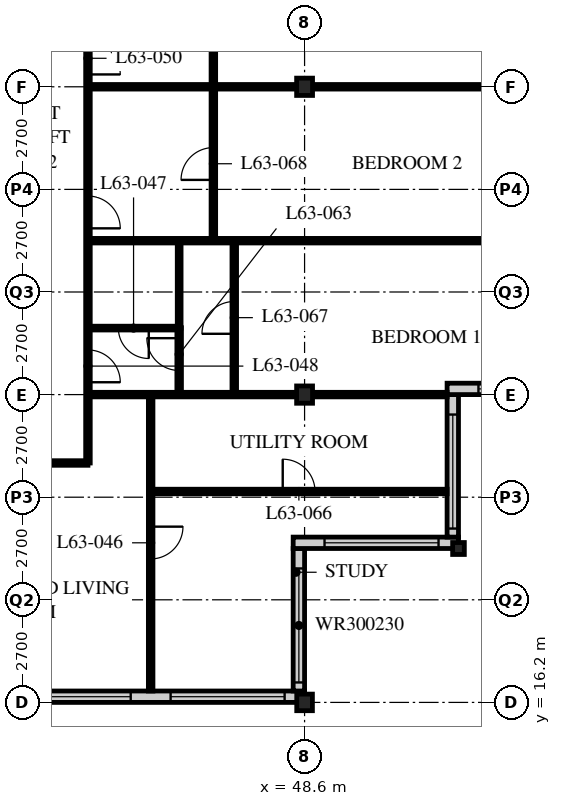
"""IFC4 building model, lengths in metres.
Left out: names, types, materials, properties, quantities, classifications, styles, units other than length and angle.
Written with IfcOpenShell. Run it as: python <this file> out.ifc"""

import sys

from ifc_helpers import new_model, si_unit, direction, frame, frame_2d, origin, origin_2d, place, context, subcontext, project, spatial, rectangle, i_section, extrude, element, fill, save


model = new_model("IFC4")
c1 = context("Model", 3, precision=1e-05, world=origin(), true_north=direction((0.0, 1.0)))
c2 = subcontext(c1, "Body", "Model", "MODEL_VIEW")
j1 = project(units=[si_unit("LENGTHUNIT", "METRE"), si_unit("PLANEANGLEUNIT", "RADIAN")], contexts=[c1])
p1 = place(None, origin())
s1 = spatial("IfcSite", under=j1, at=p1, CompositionType="ELEMENT")
p2 = place(p1, origin())
s2 = spatial("IfcBuilding", under=s1, at=p2, CompositionType="ELEMENT")
p3 = place(p2, frame((0.0, 0.0, 246.3)))
s3 = spatial("IfcBuildingStorey", under=s2, at=p3, CompositionType="ELEMENT", Elevation=246.3)
p4 = place(p3, frame((48.6, 16.2, 0.0), z_axis=(0.0, 0.0, 1.0), x_axis=(1.0, 0.0, 0.0)))
e1 = element("IfcColumn", 1, at=p4, inside=s3, PredefinedType="COLUMN", context=c2, shape_type="SweptSolid", body=[
    extrude(i_section(OverallWidth=0.412, OverallDepth=0.437, WebThickness=0.036, FlangeThickness=0.058, FilletRadius=0.015, at=origin_2d()), origin(), (0.0, 0.0, 1.0), 3.9),
])
for number, where, z_axis, x_axis in (
    (2, (48.6, 24.3, 0.0), (0.0, 0.0, 1.0), (1.0, 0.0, 0.0)),
    (3, (48.6, 32.4, 0.0), (0.0, 0.0, 1.0), (1.0, 0.0, 0.0)),
):
    element("IfcColumn", number, at=place(p3, frame(where, z_axis=z_axis, x_axis=x_axis)), inside=s3, PredefinedType="COLUMN", context=c2, shape_type="SweptSolid", body=[
        extrude(i_section(OverallWidth=0.418, OverallDepth=0.456, WebThickness=0.042, FlangeThickness=0.067, FilletRadius=0.015, at=origin_2d()), origin(), (0.0, 0.0, 1.0), 3.9),
    ])
p5 = place(p3, frame((52.65, 20.25, 0.0), z_axis=(0.0, 0.0, 1.0), x_axis=(1.0, 0.0, 0.0)))
e4 = element("IfcColumn", 4, at=p5, inside=s3, PredefinedType="COLUMN", context=c2, shape_type="SweptSolid", body=[
    extrude(i_section(OverallWidth=0.307, OverallDepth=0.314, WebThickness=0.012, FlangeThickness=0.019, FilletRadius=0.015, at=origin_2d()), origin(), (0.0, 0.0, 1.0), 3.9),
])
p6 = place(p3, frame((8.4, 16.35, 0.0), z_axis=(0.0, 0.0, 1.0), x_axis=(1.0, 0.0, 0.0)))
e5 = element("IfcWall", 5, at=p6, inside=s3, PredefinedType="SOLIDWALL", context=c2, shape_type="SweptSolid", body=[
    extrude(rectangle(XDim=40.2, YDim=0.3, at=frame_2d((20.1, 0.0))), origin(), (0.0, 0.0, 1.0), 3.69),
])
p7 = place(p6, frame((0.225, 0.0, 0.6)))
e6 = element("IfcOpeningElement", 6, at=p7, cuts=e5, PredefinedType="OPENING", context=c2, shape_type="SweptSolid", body=[
    extrude(rectangle(XDim=3.0, YDim=2.4, at=frame_2d((1.5, 1.2))), frame((0.0, 0.16, 0.0), z_axis=(0.0, -1.0, 0.0), x_axis=(1.0, 0.0, 0.0)), (0.0, 0.0, 1.0), 0.32),
])
p8 = place(p6, frame((4.275, 0.0, 0.6)))
e7 = element("IfcOpeningElement", 7, at=p8, cuts=e5, PredefinedType="OPENING", context=c2, shape_type="SweptSolid", body=[
    extrude(rectangle(XDim=3.0, YDim=2.4, at=frame_2d((1.5, 1.2))), frame((0.0, 0.16, 0.0), z_axis=(0.0, -1.0, 0.0), x_axis=(1.0, 0.0, 0.0)), (0.0, 0.0, 1.0), 0.32),
])
p9 = place(p6, frame((8.325, 0.0, 0.6)))
e8 = element("IfcOpeningElement", 8, at=p9, cuts=e5, PredefinedType="OPENING", context=c2, shape_type="SweptSolid", body=[
    extrude(rectangle(XDim=3.0, YDim=2.4, at=frame_2d((1.5, 1.2))), frame((0.0, 0.16, 0.0), z_axis=(0.0, -1.0, 0.0), x_axis=(1.0, 0.0, 0.0)), (0.0, 0.0, 1.0), 0.32),
])
p10 = place(p6, frame((12.375, 0.0, 0.6)))
e9 = element("IfcOpeningElement", 9, at=p10, cuts=e5, PredefinedType="OPENING", context=c2, shape_type="SweptSolid", body=[
    extrude(rectangle(XDim=3.0, YDim=2.4, at=frame_2d((1.5, 1.2))), frame((0.0, 0.16, 0.0), z_axis=(0.0, -1.0, 0.0), x_axis=(1.0, 0.0, 0.0)), (0.0, 0.0, 1.0), 0.32),
])
p11 = place(p6, frame((16.425, 0.0, 0.6)))
e10 = element("IfcOpeningElement", 10, at=p11, cuts=e5, PredefinedType="OPENING", context=c2, shape_type="SweptSolid", body=[
    extrude(rectangle(XDim=3.0, YDim=2.4, at=frame_2d((1.5, 1.2))), frame((0.0, 0.16, 0.0), z_axis=(0.0, -1.0, 0.0), x_axis=(1.0, 0.0, 0.0)), (0.0, 0.0, 1.0), 0.32),
])
p12 = place(p6, frame((20.475, 0.0, 0.6)))
e11 = element("IfcOpeningElement", 11, at=p12, cuts=e5, PredefinedType="OPENING", context=c2, shape_type="SweptSolid", body=[
    extrude(rectangle(XDim=3.0, YDim=2.4, at=frame_2d((1.5, 1.2))), frame((0.0, 0.16, 0.0), z_axis=(0.0, -1.0, 0.0), x_axis=(1.0, 0.0, 0.0)), (0.0, 0.0, 1.0), 0.32),
])
p13 = place(p6, frame((24.525, 0.0, 0.6)))
e12 = element("IfcOpeningElement", 12, at=p13, cuts=e5, PredefinedType="OPENING", context=c2, shape_type="SweptSolid", body=[
    extrude(rectangle(XDim=3.0, YDim=2.4, at=frame_2d((1.5, 1.2))), frame((0.0, 0.16, 0.0), z_axis=(0.0, -1.0, 0.0), x_axis=(1.0, 0.0, 0.0)), (0.0, 0.0, 1.0), 0.32),
])
p14 = place(p6, frame((28.575, 0.0, 0.6)))
e13 = element("IfcOpeningElement", 13, at=p14, cuts=e5, PredefinedType="OPENING", context=c2, shape_type="SweptSolid", body=[
    extrude(rectangle(XDim=3.0, YDim=2.4, at=frame_2d((1.5, 1.2))), frame((0.0, 0.16, 0.0), z_axis=(0.0, -1.0, 0.0), x_axis=(1.0, 0.0, 0.0)), (0.0, 0.0, 1.0), 0.32),
])
p15 = place(p6, frame((32.625, 0.0, 0.6)))
e14 = element("IfcOpeningElement", 14, at=p15, cuts=e5, PredefinedType="OPENING", context=c2, shape_type="SweptSolid", body=[
    extrude(rectangle(XDim=3.0, YDim=2.4, at=frame_2d((1.5, 1.2))), frame((0.0, 0.16, 0.0), z_axis=(0.0, -1.0, 0.0), x_axis=(1.0, 0.0, 0.0)), (0.0, 0.0, 1.0), 0.32),
])
p16 = place(p6, frame((36.675, 0.0, 0.6)))
e15 = element("IfcOpeningElement", 15, at=p16, cuts=e5, PredefinedType="OPENING", context=c2, shape_type="SweptSolid", body=[
    extrude(rectangle(XDim=3.0, YDim=2.4, at=frame_2d((1.5, 1.2))), frame((0.0, 0.16, 0.0), z_axis=(0.0, -1.0, 0.0), x_axis=(1.0, 0.0, 0.0)), (0.0, 0.0, 1.0), 0.32),
])
p17 = place(p3, frame((48.45, 16.5, 0.0), z_axis=(0.0, 0.0, 1.0), x_axis=(0.0, 1.0, 0.0)))
e16 = element("IfcWall", 16, at=p17, inside=s3, PredefinedType="SOLIDWALL", context=c2, shape_type="SweptSolid", body=[
    extrude(rectangle(XDim=3.75, YDim=0.3, at=frame_2d((1.875, 0.0))), origin(), (0.0, 0.0, 1.0), 3.69),
])
p18 = place(p17, frame((0.225, 0.0, 0.6)))
e17 = element("IfcOpeningElement", 17, at=p18, cuts=e16, PredefinedType="OPENING", context=c2, shape_type="SweptSolid", body=[
    extrude(rectangle(XDim=3.0, YDim=2.3, at=frame_2d((1.5, 1.15))), frame((0.0, 0.16, 0.0), z_axis=(0.0, -1.0, 0.0), x_axis=(1.0, 0.0, 0.0)), (0.0, 0.0, 1.0), 0.32),
])
p19 = place(p3, frame((48.3, 20.4, 0.0), z_axis=(0.0, 0.0, 1.0), x_axis=(1.0, 0.0, 0.0)))
e18 = element("IfcWall", 18, at=p19, inside=s3, PredefinedType="SOLIDWALL", context=c2, shape_type="SweptSolid", body=[
    extrude(rectangle(XDim=4.35, YDim=0.3, at=frame_2d((2.175, 0.0))), origin(), (0.0, 0.0, 1.0), 3.69),
])
p20 = place(p19, frame((0.825, 0.0, 0.6)))
e19 = element("IfcOpeningElement", 19, at=p20, cuts=e18, PredefinedType="OPENING", context=c2, shape_type="SweptSolid", body=[
    extrude(rectangle(XDim=3.0, YDim=2.3, at=frame_2d((1.5, 1.15))), frame((0.0, 0.16, 0.0), z_axis=(0.0, -1.0, 0.0), x_axis=(1.0, 0.0, 0.0)), (0.0, 0.0, 1.0), 0.32),
])
p21 = place(p3, frame((52.5, 20.55, 0.0), z_axis=(0.0, 0.0, 1.0), x_axis=(0.0, 1.0, 0.0)))
e20 = element("IfcWall", 20, at=p21, inside=s3, PredefinedType="SOLIDWALL", context=c2, shape_type="SweptSolid", body=[
    extrude(rectangle(XDim=3.75, YDim=0.3, at=frame_2d((1.875, 0.0))), origin(), (0.0, 0.0, 1.0), 3.69),
])
p22 = place(p21, frame((0.225, 0.0, 0.6)))
e21 = element("IfcOpeningElement", 21, at=p22, cuts=e20, PredefinedType="OPENING", context=c2, shape_type="SweptSolid", body=[
    extrude(rectangle(XDim=3.0, YDim=2.3, at=frame_2d((1.5, 1.15))), frame((0.0, 0.16, 0.0), z_axis=(0.0, -1.0, 0.0), x_axis=(1.0, 0.0, 0.0)), (0.0, 0.0, 1.0), 0.32),
])
p23 = place(p3, frame((52.35, 24.45, 0.0), z_axis=(0.0, 0.0, 1.0), x_axis=(1.0, 0.0, 0.0)))
e22 = element("IfcWall", 22, at=p23, inside=s3, PredefinedType="SOLIDWALL", context=c2, shape_type="SweptSolid", body=[
    extrude(rectangle(XDim=4.35, YDim=0.3, at=frame_2d((2.175, 0.0))), origin(), (0.0, 0.0, 1.0), 3.69),
])
p24 = place(p23, frame((0.825, 0.0, 0.6)))
e23 = element("IfcOpeningElement", 23, at=p24, cuts=e22, PredefinedType="OPENING", context=c2, shape_type="SweptSolid", body=[
    extrude(rectangle(XDim=3.0, YDim=2.3, at=frame_2d((1.5, 1.15))), frame((0.0, 0.16, 0.0), z_axis=(0.0, -1.0, 0.0), x_axis=(1.0, 0.0, 0.0)), (0.0, 0.0, 1.0), 0.32),
])
p25 = place(p3, frame((42.9, 22.5, 0.0), z_axis=(0.0, 0.0, 1.0), x_axis=(0.0, 1.0, 0.0)))
e24 = element("IfcWall", 24, at=p25, inside=s3, PredefinedType="PARTITIONING", context=c2, shape_type="SweptSolid", body=[
    extrude(rectangle(XDim=13.95, YDim=0.12, at=frame_2d((6.975, 0.0))), origin(), (0.0, 0.0, 1.0), 3.69),
])
p26 = place(p25, frame((2.125, 0.0, 0.0)))
e25 = element("IfcOpeningElement", 25, at=p26, cuts=e24, PredefinedType="OPENING", context=c2, shape_type="SweptSolid", body=[
    extrude(rectangle(XDim=0.85, YDim=2.1, at=frame_2d((0.425, 1.05))), frame((0.0, 0.07, 0.0), z_axis=(0.0, -1.0, 0.0), x_axis=(1.0, 0.0, 0.0)), (0.0, 0.0, 1.0), 0.14),
])
p27 = place(p25, frame((6.175, 0.0, 0.0)))
e26 = element("IfcOpeningElement", 26, at=p27, cuts=e24, PredefinedType="OPENING", context=c2, shape_type="SweptSolid", body=[
    extrude(rectangle(XDim=0.85, YDim=2.1, at=frame_2d((0.425, 1.05))), frame((0.0, 0.07, 0.0), z_axis=(0.0, -1.0, 0.0), x_axis=(1.0, 0.0, 0.0)), (0.0, 0.0, 1.0), 0.14),
])
p28 = place(p25, frame((10.225, 0.0, 0.0)))
e27 = element("IfcOpeningElement", 27, at=p28, cuts=e24, PredefinedType="OPENING", context=c2, shape_type="SweptSolid", body=[
    extrude(rectangle(XDim=0.85, YDim=2.1, at=frame_2d((0.425, 1.05))), frame((0.0, 0.07, 0.0), z_axis=(0.0, -1.0, 0.0), x_axis=(1.0, 0.0, 0.0)), (0.0, 0.0, 1.0), 0.14),
])
p29 = place(p3, frame((36.45, 22.5, 0.0), z_axis=(0.0, 0.0, 1.0), x_axis=(1.0, 0.0, 0.0)))
e28 = element("IfcWall", 28, at=p29, inside=s3, PredefinedType="PARTITIONING", context=c2, shape_type="SweptSolid", body=[
    extrude(rectangle(XDim=6.45, YDim=0.12, at=frame_2d((3.225, 0.0))), origin(), (0.0, 0.0, 1.0), 3.69),
])
p30 = place(p29, frame((2.8, 0.0, 0.0)))
e29 = element("IfcOpeningElement", 29, at=p30, cuts=e28, PredefinedType="OPENING", context=c2, shape_type="SweptSolid", body=[
    extrude(rectangle(XDim=0.85, YDim=2.1, at=frame_2d((0.425, 1.05))), frame((0.0, 0.07, 0.0), z_axis=(0.0, -1.0, 0.0), x_axis=(1.0, 0.0, 0.0)), (0.0, 0.0, 1.0), 0.14),
])
p31 = place(p3, frame((42.9, 24.3, 0.0), z_axis=(0.0, 0.0, 1.0), x_axis=(1.0, 0.0, 0.0)))
e30 = element("IfcWall", 30, at=p31, inside=s3, PredefinedType="PARTITIONING", context=c2, shape_type="SweptSolid", body=[
    extrude(rectangle(XDim=9.45, YDim=0.12, at=frame_2d((4.725, 0.0))), origin(), (0.0, 0.0, 1.0), 3.078),
])
p32 = place(p3, frame((44.55, 16.5, 0.0), z_axis=(0.0, 0.0, 1.0), x_axis=(0.0, 1.0, 0.0)))
e31 = element("IfcWall", 31, at=p32, inside=s3, PredefinedType="PARTITIONING", context=c2, shape_type="SweptSolid", body=[
    extrude(rectangle(XDim=7.8, YDim=0.12, at=frame_2d((3.9, 0.0))), origin(), (0.0, 0.0, 1.0), 3.69),
])
p33 = place(p32, frame((3.475, 0.0, 0.0)))
e32 = element("IfcOpeningElement", 32, at=p33, cuts=e31, PredefinedType="OPENING", context=c2, shape_type="SweptSolid", body=[
    extrude(rectangle(XDim=0.85, YDim=2.1, at=frame_2d((0.425, 1.05))), frame((0.0, 0.07, 0.0), z_axis=(0.0, -1.0, 0.0), x_axis=(1.0, 0.0, 0.0)), (0.0, 0.0, 1.0), 0.14),
])
p34 = place(p3, frame((42.9, 26.05, 0.0), z_axis=(0.0, 0.0, 1.0), x_axis=(1.0, 0.0, 0.0)))
e33 = element("IfcWall", 33, at=p34, inside=s3, PredefinedType="PARTITIONING", context=c2, shape_type="SweptSolid", body=[
    extrude(rectangle(XDim=2.4, YDim=0.1, at=frame_2d((1.2, 0.0))), origin(), (0.0, 0.0, 1.0), 3.69),
])
p35 = place(p34, frame((0.8, 0.0, 0.0)))
e34 = element("IfcOpeningElement", 34, at=p35, cuts=e33, PredefinedType="OPENING", context=c2, shape_type="SweptSolid", body=[
    extrude(rectangle(XDim=0.8, YDim=2.1, at=frame_2d((0.4, 1.05))), frame((0.0, 0.06, 0.0), z_axis=(0.0, -1.0, 0.0), x_axis=(1.0, 0.0, 0.0)), (0.0, 0.0, 1.0), 0.12),
])
p36 = place(p3, frame((45.3, 26.05, 0.0), z_axis=(0.0, 0.0, 1.0), x_axis=(0.0, 1.0, 0.0)))
e35 = element("IfcWall", 35, at=p36, inside=s3, PredefinedType="PARTITIONING", context=c2, shape_type="SweptSolid", body=[
    extrude(rectangle(XDim=2.3, YDim=0.1, at=frame_2d((1.15, 0.0))), origin(), (0.0, 0.0, 1.0), 3.69),
])
p37 = place(p3, frame((42.9, 28.35, 0.0), z_axis=(0.0, 0.0, 1.0), x_axis=(1.0, 0.0, 0.0)))
e36 = element("IfcWall", 36, at=p37, inside=s3, PredefinedType="PARTITIONING", context=c2, shape_type="SweptSolid", body=[
    extrude(rectangle(XDim=13.5, YDim=0.12, at=frame_2d((6.75, 0.0))), origin(), (0.0, 0.0, 1.0), 3.69),
])
p38 = place(p3, frame((42.9, 32.4, 0.0), z_axis=(0.0, 0.0, 1.0), x_axis=(1.0, 0.0, 0.0)))
e37 = element("IfcWall", 37, at=p38, inside=s3, PredefinedType="PARTITIONING", context=c2, shape_type="SweptSolid", body=[
    extrude(rectangle(XDim=13.5, YDim=0.12, at=frame_2d((6.75, 0.0))), origin(), (0.0, 0.0, 1.0), 3.078),
])
p39 = place(p3, frame((45.3, 24.3, 0.0), z_axis=(0.0, 0.0, 1.0), x_axis=(0.0, 1.0, 0.0)))
e38 = element("IfcWall", 38, at=p39, inside=s3, PredefinedType="PARTITIONING", context=c2, shape_type="SweptSolid", body=[
    extrude(rectangle(XDim=1.76, YDim=0.12, at=frame_2d((0.88, 0.0))), origin(), (0.0, 0.0, 1.0), 3.69),
])
p40 = place(p39, frame((0.635, 0.0, 0.0)))
e39 = element("IfcOpeningElement", 39, at=p40, cuts=e38, PredefinedType="OPENING", context=c2, shape_type="SweptSolid", body=[
    extrude(rectangle(XDim=0.85, YDim=2.1, at=frame_2d((0.425, 1.05))), frame((0.0, 0.07, 0.0), z_axis=(0.0, -1.0, 0.0), x_axis=(1.0, 0.0, 0.0)), (0.0, 0.0, 1.0), 0.14),
])
p41 = place(p3, frame((44.55, 21.75, 0.0), z_axis=(0.0, 0.0, 1.0), x_axis=(1.0, 0.0, 0.0)))
e40 = element("IfcWall", 40, at=p41, inside=s3, PredefinedType="PARTITIONING", context=c2, shape_type="SweptSolid", body=[
    extrude(rectangle(XDim=7.8, YDim=0.12, at=frame_2d((3.9, 0.0))), origin(), (0.0, 0.0, 1.0), 3.69),
])
p42 = place(p41, frame((3.475, 0.0, 0.0)))
e41 = element("IfcOpeningElement", 41, at=p42, cuts=e40, PredefinedType="OPENING", context=c2, shape_type="SweptSolid", body=[
    extrude(rectangle(XDim=0.85, YDim=2.1, at=frame_2d((0.425, 1.05))), frame((0.0, 0.07, 0.0), z_axis=(0.0, -1.0, 0.0), x_axis=(1.0, 0.0, 0.0)), (0.0, 0.0, 1.0), 0.14),
])
p43 = place(p3, frame((46.75, 24.3, 0.0), z_axis=(0.0, 0.0, 1.0), x_axis=(0.0, 1.0, 0.0)))
e42 = element("IfcWall", 42, at=p43, inside=s3, PredefinedType="PARTITIONING", context=c2, shape_type="SweptSolid", body=[
    extrude(rectangle(XDim=4.05, YDim=0.12, at=frame_2d((2.025, 0.0))), origin(), (0.0, 0.0, 1.0), 3.69),
])
p44 = place(p43, frame((1.6, 0.0, 0.0)))
e43 = element("IfcOpeningElement", 43, at=p44, cuts=e42, PredefinedType="OPENING", context=c2, shape_type="SweptSolid", body=[
    extrude(rectangle(XDim=0.85, YDim=2.1, at=frame_2d((0.425, 1.05))), frame((0.0, 0.07, 0.0), z_axis=(0.0, -1.0, 0.0), x_axis=(1.0, 0.0, 0.0)), (0.0, 0.0, 1.0), 0.14),
])
p45 = place(p3, frame((46.2, 28.35, 0.0), z_axis=(0.0, 0.0, 1.0), x_axis=(0.0, 1.0, 0.0)))
e44 = element("IfcWall", 44, at=p45, inside=s3, PredefinedType="PARTITIONING", context=c2, shape_type="SweptSolid", body=[
    extrude(rectangle(XDim=16.2, YDim=0.12, at=frame_2d((8.1, 0.0))), origin(), (0.0, 0.0, 1.0), 3.69),
])
p46 = place(p45, frame((1.6, 0.0, 0.0)))
e45 = element("IfcOpeningElement", 45, at=p46, cuts=e44, PredefinedType="OPENING", context=c2, shape_type="SweptSolid", body=[
    extrude(rectangle(XDim=0.85, YDim=2.1, at=frame_2d((0.425, 1.05))), frame((0.0, 0.07, 0.0), z_axis=(0.0, -1.0, 0.0), x_axis=(1.0, 0.0, 0.0)), (0.0, 0.0, 1.0), 0.14),
])
p47 = place(p45, frame((5.65, 0.0, 0.0)))
e46 = element("IfcOpeningElement", 46, at=p47, cuts=e44, PredefinedType="OPENING", context=c2, shape_type="SweptSolid", body=[
    extrude(rectangle(XDim=0.85, YDim=2.1, at=frame_2d((0.425, 1.05))), frame((0.0, 0.07, 0.0), z_axis=(0.0, -1.0, 0.0), x_axis=(1.0, 0.0, 0.0)), (0.0, 0.0, 1.0), 0.14),
])
p48 = place(p45, frame((13.75, 0.0, 0.0)))
e47 = element("IfcOpeningElement", 47, at=p48, cuts=e44, PredefinedType="OPENING", context=c2, shape_type="SweptSolid", body=[
    extrude(rectangle(XDim=0.85, YDim=2.1, at=frame_2d((0.425, 1.05))), frame((0.0, 0.07, 0.0), z_axis=(0.0, -1.0, 0.0), x_axis=(1.0, 0.0, 0.0)), (0.0, 0.0, 1.0), 0.14),
])
p49 = place(p45, frame((9.7, 0.0, 0.0)))
e48 = element("IfcOpeningElement", 48, at=p49, cuts=e44, PredefinedType="OPENING", context=c2, shape_type="SweptSolid", body=[
    extrude(rectangle(XDim=0.85, YDim=2.1, at=frame_2d((0.425, 1.05))), frame((0.0, 0.07, 0.0), z_axis=(0.0, -1.0, 0.0), x_axis=(1.0, 0.0, 0.0)), (0.0, 0.0, 1.0), 0.14),
])
p50 = place(p15, origin())
e49 = element("IfcWindow", 49, at=p50, inside=s3, PartitioningType="SINGLE_PANEL", PredefinedType="WINDOW", context=c2, shape_type="SweptSolid", body=[
    extrude(rectangle(XDim=3.0, YDim=2.4, at=frame_2d((1.5, 1.2))), frame((0.0, 0.03, 0.0), z_axis=(0.0, -1.0, 0.0), x_axis=(1.0, 0.0, 0.0)), (0.0, 0.0, 1.0), 0.06),
])
fill(e14, e49)
p51 = place(p16, origin())
e50 = element("IfcWindow", 50, at=p51, inside=s3, PartitioningType="SINGLE_PANEL", PredefinedType="WINDOW", context=c2, shape_type="SweptSolid", body=[
    extrude(rectangle(XDim=3.0, YDim=2.4, at=frame_2d((1.5, 1.2))), frame((0.0, 0.03, 0.0), z_axis=(0.0, -1.0, 0.0), x_axis=(1.0, 0.0, 0.0)), (0.0, 0.0, 1.0), 0.06),
])
fill(e15, e50)
p52 = place(p18, origin())
e51 = element("IfcWindow", 51, at=p52, inside=s3, PartitioningType="SINGLE_PANEL", PredefinedType="WINDOW", context=c2, shape_type="SweptSolid", body=[
    extrude(rectangle(XDim=3.0, YDim=2.3, at=frame_2d((1.5, 1.15))), frame((0.0, 0.03, 0.0), z_axis=(0.0, -1.0, 0.0), x_axis=(1.0, 0.0, 0.0)), (0.0, 0.0, 1.0), 0.06),
])
fill(e17, e51)
p53 = place(p20, origin())
e52 = element("IfcWindow", 52, at=p53, inside=s3, PartitioningType="SINGLE_PANEL", PredefinedType="WINDOW", context=c2, shape_type="SweptSolid", body=[
    extrude(rectangle(XDim=3.0, YDim=2.3, at=frame_2d((1.5, 1.15))), frame((0.0, 0.03, 0.0), z_axis=(0.0, -1.0, 0.0), x_axis=(1.0, 0.0, 0.0)), (0.0, 0.0, 1.0), 0.06),
])
fill(e19, e52)
p54 = place(p22, origin())
e53 = element("IfcWindow", 53, at=p54, inside=s3, PartitioningType="SINGLE_PANEL", PredefinedType="WINDOW", context=c2, shape_type="SweptSolid", body=[
    extrude(rectangle(XDim=3.0, YDim=2.3, at=frame_2d((1.5, 1.15))), frame((0.0, 0.03, 0.0), z_axis=(0.0, -1.0, 0.0), x_axis=(1.0, 0.0, 0.0)), (0.0, 0.0, 1.0), 0.06),
])
fill(e21, e53)
p55 = place(p24, origin())
e54 = element("IfcWindow", 54, at=p55, inside=s3, PartitioningType="SINGLE_PANEL", PredefinedType="WINDOW", context=c2, shape_type="SweptSolid", body=[
    extrude(rectangle(XDim=3.0, YDim=2.3, at=frame_2d((1.5, 1.15))), frame((0.0, 0.03, 0.0), z_axis=(0.0, -1.0, 0.0), x_axis=(1.0, 0.0, 0.0)), (0.0, 0.0, 1.0), 0.06),
])
fill(e23, e54)
p56 = place(p33, origin())
e55 = element("IfcDoor", 55, at=p56, inside=s3, OperationType="SINGLE_SWING_LEFT", PredefinedType="DOOR", context=c2, shape_type="SweptSolid", body=[
    extrude(rectangle(XDim=0.85, YDim=2.1, at=frame_2d((0.425, 1.05))), frame((0.0, 0.025, 0.0), z_axis=(0.0, -1.0, 0.0), x_axis=(1.0, 0.0, 0.0)), (0.0, 0.0, 1.0), 0.05),
])
fill(e32, e55)
p57 = place(p35, origin())
e56 = element("IfcDoor", 56, at=p57, inside=s3, OperationType="SINGLE_SWING_LEFT", PredefinedType="DOOR", context=c2, shape_type="SweptSolid", body=[
    extrude(rectangle(XDim=0.8, YDim=2.1, at=frame_2d((0.4, 1.05))), frame((0.0, 0.025, 0.0), z_axis=(0.0, -1.0, 0.0), x_axis=(1.0, 0.0, 0.0)), (0.0, 0.0, 1.0), 0.05),
])
fill(e34, e56)
p58 = place(p26, origin())
e57 = element("IfcDoor", 57, at=p58, inside=s3, OperationType="SINGLE_SWING_RIGHT", PredefinedType="DOOR", context=c2, shape_type="SweptSolid", body=[
    extrude(rectangle(XDim=0.85, YDim=2.1, at=frame_2d((0.425, 1.05))), frame((0.0, 0.025, 0.0), z_axis=(0.0, -1.0, 0.0), x_axis=(1.0, 0.0, 0.0)), (0.0, 0.0, 1.0), 0.05),
])
fill(e25, e57)
p59 = place(p27, origin())
e58 = element("IfcDoor", 58, at=p59, inside=s3, OperationType="SINGLE_SWING_RIGHT", PredefinedType="DOOR", context=c2, shape_type="SweptSolid", body=[
    extrude(rectangle(XDim=0.85, YDim=2.1, at=frame_2d((0.425, 1.05))), frame((0.0, 0.025, 0.0), z_axis=(0.0, -1.0, 0.0), x_axis=(1.0, 0.0, 0.0)), (0.0, 0.0, 1.0), 0.05),
])
fill(e26, e58)
p60 = place(p28, origin())
e59 = element("IfcDoor", 59, at=p60, inside=s3, OperationType="SINGLE_SWING_RIGHT", PredefinedType="DOOR", context=c2, shape_type="SweptSolid", body=[
    extrude(rectangle(XDim=0.85, YDim=2.1, at=frame_2d((0.425, 1.05))), frame((0.0, 0.025, 0.0), z_axis=(0.0, -1.0, 0.0), x_axis=(1.0, 0.0, 0.0)), (0.0, 0.0, 1.0), 0.05),
])
fill(e27, e59)
p61 = place(p40, origin())
e60 = element("IfcDoor", 60, at=p61, inside=s3, OperationType="SINGLE_SWING_RIGHT", PredefinedType="DOOR", context=c2, shape_type="SweptSolid", body=[
    extrude(rectangle(XDim=0.85, YDim=2.1, at=frame_2d((0.425, 1.05))), frame((0.0, 0.025, 0.0), z_axis=(0.0, -1.0, 0.0), x_axis=(1.0, 0.0, 0.0)), (0.0, 0.0, 1.0), 0.05),
])
fill(e39, e60)
p62 = place(p42, origin())
e61 = element("IfcDoor", 61, at=p62, inside=s3, OperationType="SINGLE_SWING_LEFT", PredefinedType="DOOR", context=c2, shape_type="SweptSolid", body=[
    extrude(rectangle(XDim=0.85, YDim=2.1, at=frame_2d((0.425, 1.05))), frame((0.0, 0.025, 0.0), z_axis=(0.0, -1.0, 0.0), x_axis=(1.0, 0.0, 0.0)), (0.0, 0.0, 1.0), 0.05),
])
fill(e41, e61)
p63 = place(p44, origin())
e62 = element("IfcDoor", 62, at=p63, inside=s3, OperationType="SINGLE_SWING_LEFT", PredefinedType="DOOR", context=c2, shape_type="SweptSolid", body=[
    extrude(rectangle(XDim=0.85, YDim=2.1, at=frame_2d((0.425, 1.05))), frame((0.0, 0.025, 0.0), z_axis=(0.0, -1.0, 0.0), x_axis=(1.0, 0.0, 0.0)), (0.0, 0.0, 1.0), 0.05),
])
fill(e43, e62)
p64 = place(p46, origin())
e63 = element("IfcDoor", 63, at=p64, inside=s3, OperationType="SINGLE_SWING_LEFT", PredefinedType="DOOR", context=c2, shape_type="SweptSolid", body=[
    extrude(rectangle(XDim=0.85, YDim=2.1, at=frame_2d((0.425, 1.05))), frame((0.0, 0.025, 0.0), z_axis=(0.0, -1.0, 0.0), x_axis=(1.0, 0.0, 0.0)), (0.0, 0.0, 1.0), 0.05),
])
fill(e45, e63)
save(model, sys.argv[1])
